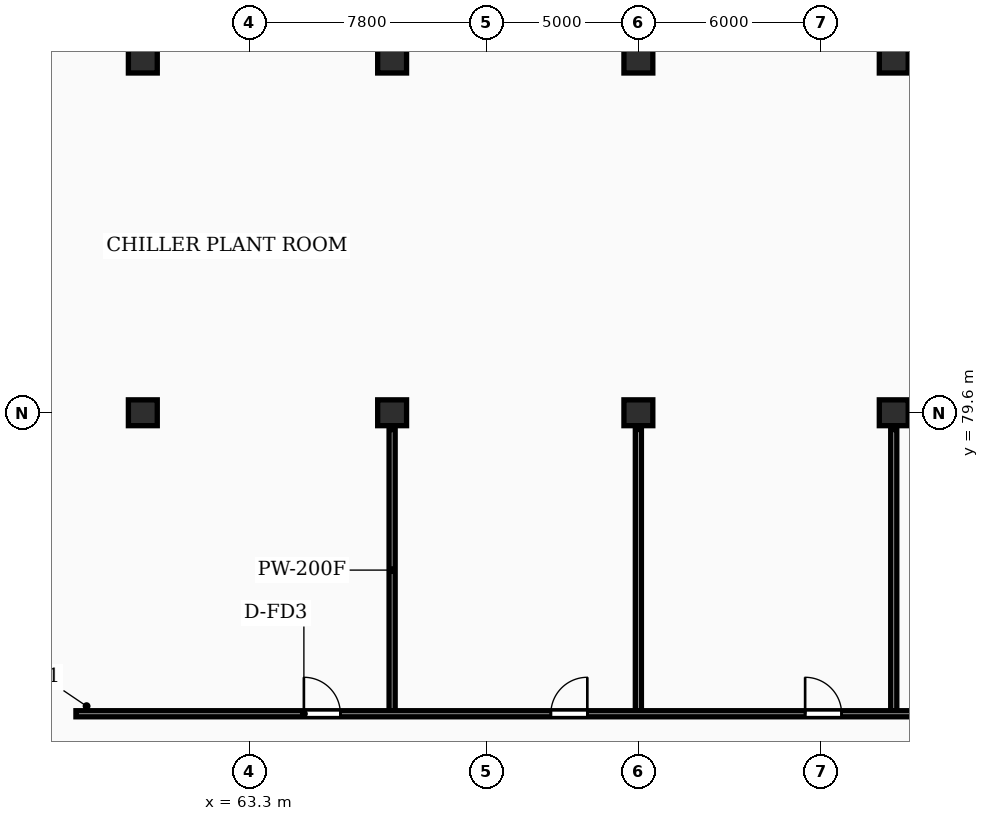
"""IFC4 building model, lengths in metres.
Left out: names, types, materials, properties, quantities, classifications, styles, units other than length and angle.
Written with IfcOpenShell. Run it as: python <this file> out.ifc"""

import sys

from ifc_helpers import new_model, si_unit, direction, frame, frame_2d, origin, origin_2d, place, context, subcontext, project, spatial, rectangle, extrude, element, fill, save


model = new_model("IFC4")
c1 = context("Model", 3, precision=1e-05, world=origin(), true_north=direction((0.0, 1.0)))
c2 = subcontext(c1, "Body", "Model", "MODEL_VIEW")
j1 = project(units=[si_unit("LENGTHUNIT", "METRE"), si_unit("PLANEANGLEUNIT", "RADIAN")], contexts=[c1])
p1 = place(None, origin())
s1 = spatial("IfcSite", under=j1, at=p1, CompositionType="ELEMENT")
p2 = place(p1, origin())
s2 = spatial("IfcBuilding", under=s1, at=p2, CompositionType="ELEMENT")
p3 = place(p2, frame((0.0, 0.0, 157.3)))
s3 = spatial("IfcBuildingStorey", under=s2, at=p3, CompositionType="ELEMENT", Elevation=157.3)
for number, where, z_axis, x_axis in (
    (1, (59.8, 79.6, 0.0), (0.0, 0.0, 1.0), (1.0, 0.0, 0.0)),
    (2, (59.8, 91.2, 0.0), (0.0, 0.0, 1.0), (1.0, 0.0, 0.0)),
    (3, (68.0, 79.6, 0.0), (0.0, 0.0, 1.0), (1.0, 0.0, 0.0)),
    (4, (68.0, 91.2, 0.0), (0.0, 0.0, 1.0), (1.0, 0.0, 0.0)),
    (5, (76.1, 79.6, 0.0), (0.0, 0.0, 1.0), (1.0, 0.0, 0.0)),
    (6, (76.1, 91.2, 0.0), (0.0, 0.0, 1.0), (1.0, 0.0, 0.0)),
    (7, (84.5, 79.6, 0.0), (0.0, 0.0, 1.0), (1.0, 0.0, 0.0)),
    (8, (84.5, 91.2, 0.0), (0.0, 0.0, 1.0), (1.0, 0.0, 0.0)),
):
    element("IfcColumn", number, at=place(p3, frame(where, z_axis=z_axis, x_axis=x_axis)), inside=s3, PredefinedType="COLUMN", context=c2, shape_type="SweptSolid", body=[
        extrude(rectangle(XDim=0.95, YDim=0.85, at=origin_2d()), origin(), (0.0, 0.0, 1.0), 4.8),
    ])
for number, where, z_axis, x_axis in (
    (9, (68.0, 69.8, 0.0), (0.0, 0.0, 1.0), (0.0, 1.0, 0.0)),
    (10, (76.1, 69.8, 0.0), (0.0, 0.0, 1.0), (0.0, 1.0, 0.0)),
    (11, (84.5, 69.8, 0.0), (0.0, 0.0, 1.0), (0.0, 1.0, 0.0)),
):
    element("IfcWall", number, at=place(p3, frame(where, z_axis=z_axis, x_axis=x_axis)), inside=s3, PredefinedType="PARTITIONING", context=c2, shape_type="SweptSolid", body=[
        extrude(rectangle(XDim=9.25, YDim=0.2, at=frame_2d((4.625, 0.0))), origin(), (0.0, 0.0, 1.0), 3.23),
    ])
p4 = place(p3, frame((57.6, 69.7, 0.0), z_axis=(0.0, 0.0, 1.0), x_axis=(1.0, 0.0, 0.0)))
e12 = element("IfcWall", 12, at=p4, inside=s3, PredefinedType="PARTITIONING", context=c2, shape_type="SweptSolid", body=[
    extrude(rectangle(XDim=73.0, YDim=0.2, at=frame_2d((36.5, 0.0))), origin(), (0.0, 0.0, 1.0), 4.48),
])
p5 = place(p4, frame((7.498, 0.0, 0.0)))
e13 = element("IfcOpeningElement", 13, at=p5, cuts=e12, PredefinedType="OPENING", context=c2, shape_type="SweptSolid", body=[
    extrude(rectangle(XDim=1.2, YDim=2.15, at=frame_2d((0.6, 1.075))), frame((0.0, 0.11, 0.0), z_axis=(0.0, -1.0, 0.0), x_axis=(1.0, 0.0, 0.0)), (0.0, 0.0, 1.0), 0.22),
])
p6 = place(p4, frame((15.621, 0.0, 0.0)))
e14 = element("IfcOpeningElement", 14, at=p6, cuts=e12, PredefinedType="OPENING", context=c2, shape_type="SweptSolid", body=[
    extrude(rectangle(XDim=1.2, YDim=2.15, at=frame_2d((0.6, 1.075))), frame((0.0, 0.11, 0.0), z_axis=(0.0, -1.0, 0.0), x_axis=(1.0, 0.0, 0.0)), (0.0, 0.0, 1.0), 0.22),
])
p7 = place(p4, frame((23.985, 0.0, 0.0)))
e15 = element("IfcOpeningElement", 15, at=p7, cuts=e12, PredefinedType="OPENING", context=c2, shape_type="SweptSolid", body=[
    extrude(rectangle(XDim=1.2, YDim=2.15, at=frame_2d((0.6, 1.075))), frame((0.0, 0.11, 0.0), z_axis=(0.0, -1.0, 0.0), x_axis=(1.0, 0.0, 0.0)), (0.0, 0.0, 1.0), 0.22),
])
p8 = place(p4, frame((33.204, 0.0, 0.0)))
e16 = element("IfcOpeningElement", 16, at=p8, cuts=e12, PredefinedType="OPENING", context=c2, shape_type="SweptSolid", body=[
    extrude(rectangle(XDim=1.2, YDim=2.15, at=frame_2d((0.6, 1.075))), frame((0.0, 0.11, 0.0), z_axis=(0.0, -1.0, 0.0), x_axis=(1.0, 0.0, 0.0)), (0.0, 0.0, 1.0), 0.22),
])
p9 = place(p4, frame((37.796, 0.0, 0.0)))
e17 = element("IfcOpeningElement", 17, at=p9, cuts=e12, PredefinedType="OPENING", context=c2, shape_type="SweptSolid", body=[
    extrude(rectangle(XDim=1.2, YDim=2.15, at=frame_2d((0.6, 1.075))), frame((0.0, 0.11, 0.0), z_axis=(0.0, -1.0, 0.0), x_axis=(1.0, 0.0, 0.0)), (0.0, 0.0, 1.0), 0.22),
])
p10 = place(p4, frame((46.996, 0.0, 0.0)))
e18 = element("IfcOpeningElement", 18, at=p10, cuts=e12, PredefinedType="OPENING", context=c2, shape_type="SweptSolid", body=[
    extrude(rectangle(XDim=1.2, YDim=2.15, at=frame_2d((0.6, 1.075))), frame((0.0, 0.11, 0.0), z_axis=(0.0, -1.0, 0.0), x_axis=(1.0, 0.0, 0.0)), (0.0, 0.0, 1.0), 0.22),
])
p11 = place(p4, frame((56.191, 0.0, 0.0)))
e19 = element("IfcOpeningElement", 19, at=p11, cuts=e12, PredefinedType="OPENING", context=c2, shape_type="SweptSolid", body=[
    extrude(rectangle(XDim=1.2, YDim=2.15, at=frame_2d((0.6, 1.075))), frame((0.0, 0.11, 0.0), z_axis=(0.0, -1.0, 0.0), x_axis=(1.0, 0.0, 0.0)), (0.0, 0.0, 1.0), 0.22),
])
p12 = place(p4, frame((64.37, 0.0, 0.0)))
e20 = element("IfcOpeningElement", 20, at=p12, cuts=e12, PredefinedType="OPENING", context=c2, shape_type="SweptSolid", body=[
    extrude(rectangle(XDim=1.5, YDim=2.18, at=frame_2d((0.75, 1.09))), frame((0.0, 0.11, 0.0), z_axis=(0.0, -1.0, 0.0), x_axis=(1.0, 0.0, 0.0)), (0.0, 0.0, 1.0), 0.22),
])
p13 = place(p5, origin())
e21 = element("IfcDoor", 21, at=p13, inside=s3, OperationType="SINGLE_SWING_LEFT", PredefinedType="DOOR", context=c2, shape_type="SweptSolid", body=[
    extrude(rectangle(XDim=1.2, YDim=2.15, at=frame_2d((0.6, 1.075))), frame((0.0, 0.025, 0.0), z_axis=(0.0, -1.0, 0.0), x_axis=(1.0, 0.0, 0.0)), (0.0, 0.0, 1.0), 0.05),
])
fill(e13, e21)
p14 = place(p6, origin())
e22 = element("IfcDoor", 22, at=p14, inside=s3, OperationType="SINGLE_SWING_RIGHT", PredefinedType="DOOR", context=c2, shape_type="SweptSolid", body=[
    extrude(rectangle(XDim=1.2, YDim=2.15, at=frame_2d((0.6, 1.075))), frame((0.0, 0.025, 0.0), z_axis=(0.0, -1.0, 0.0), x_axis=(1.0, 0.0, 0.0)), (0.0, 0.0, 1.0), 0.05),
])
fill(e14, e22)
p15 = place(p7, origin())
e23 = element("IfcDoor", 23, at=p15, inside=s3, OperationType="SINGLE_SWING_LEFT", PredefinedType="DOOR", context=c2, shape_type="SweptSolid", body=[
    extrude(rectangle(XDim=1.2, YDim=2.15, at=frame_2d((0.6, 1.075))), frame((0.0, 0.025, 0.0), z_axis=(0.0, -1.0, 0.0), x_axis=(1.0, 0.0, 0.0)), (0.0, 0.0, 1.0), 0.05),
])
fill(e15, e23)
save(model, sys.argv[1])
